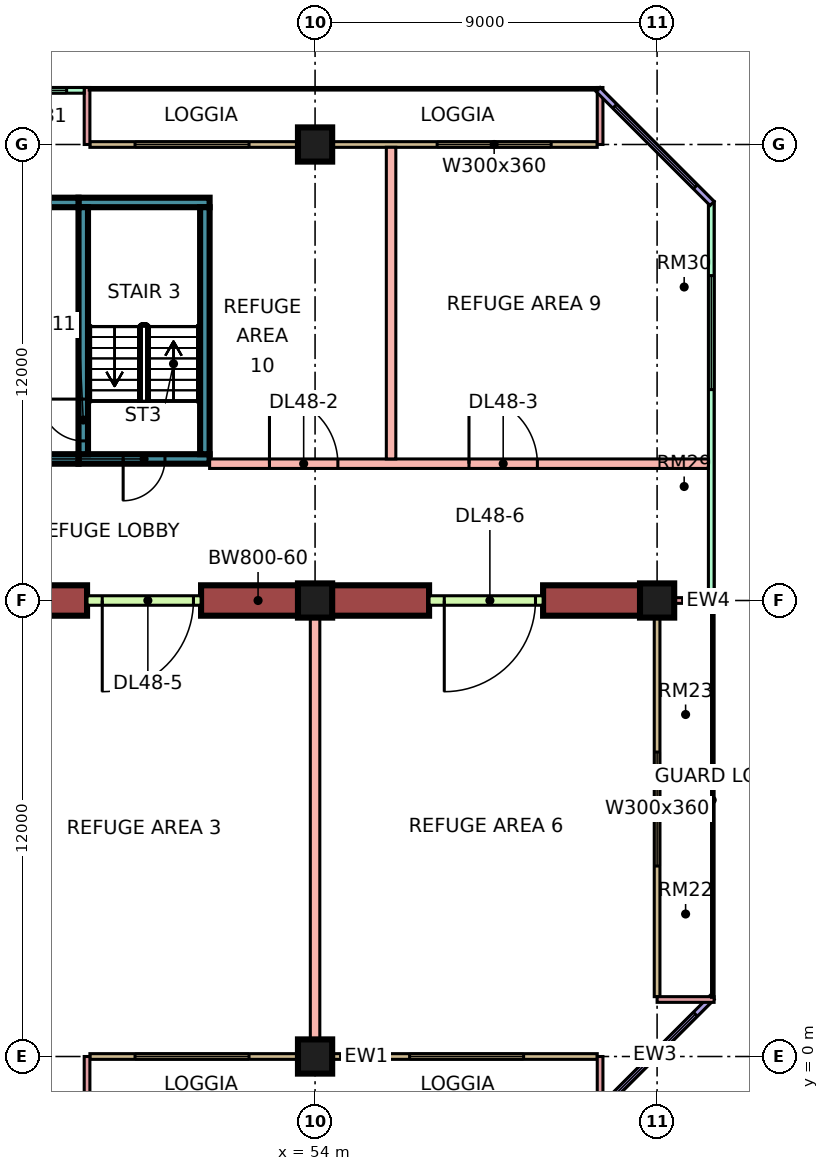
"""IFC4 building model, lengths in metres.
Left out: names, types, materials, properties, quantities, classifications, styles, units other than length and angle.
Written with IfcOpenShell. Run it as: python <this file> out.ifc"""

import sys

from ifc_helpers import new_model, si_unit, direction, frame, frame_2d, origin, origin_2d, place, context, subcontext, project, spatial, rectangle, extrude, element, fill, save


model = new_model("IFC4")
c1 = context("Model", 3, precision=1e-05, world=origin(), true_north=direction((0.0, 1.0)))
c2 = subcontext(c1, "Body", "Model", "MODEL_VIEW")
j1 = project(units=[si_unit("LENGTHUNIT", "METRE"), si_unit("PLANEANGLEUNIT", "RADIAN")], contexts=[c1])
p1 = place(None, origin())
s1 = spatial("IfcSite", under=j1, at=p1, CompositionType="ELEMENT")
p2 = place(p1, origin())
s2 = spatial("IfcBuilding", under=s1, at=p2, CompositionType="ELEMENT")
p3 = place(p2, frame((0.0, 0.0, 206.15)))
s3 = spatial("IfcBuildingStorey", under=s2, at=p3, CompositionType="ELEMENT", Elevation=206.15)
p4 = place(p3, frame((54.0, 0.0, 0.0), z_axis=(0.0, 0.0, 1.0), x_axis=(1.0, 0.0, 0.0)))
e1 = element("IfcColumn", 1, at=p4, inside=s3, PredefinedType="COLUMN", context=c2, shape_type="SweptSolid", body=[
    extrude(rectangle(XDim=0.9, YDim=0.9, at=origin_2d()), origin(), (0.0, 0.0, 1.0), 5.5),
])
p5 = place(p3, frame((54.0, 12.0, 0.0), z_axis=(0.0, 0.0, 1.0), x_axis=(1.0, 0.0, 0.0)))
e2 = element("IfcColumn", 2, at=p5, inside=s3, PredefinedType="COLUMN", context=c2, shape_type="SweptSolid", body=[
    extrude(rectangle(XDim=0.9, YDim=0.9, at=origin_2d()), origin(), (0.0, 0.0, 1.0), 5.5),
])
for number, where, z_axis, x_axis in (
    (3, (54.0, 24.0, 0.0), (0.0, 0.0, 1.0), (1.0, 0.0, 0.0)),
    (4, (63.0, 12.0, 0.0), (0.0, 0.0, 1.0), (1.0, 0.0, 0.0)),
):
    element("IfcColumn", number, at=place(p3, frame(where, z_axis=z_axis, x_axis=x_axis)), inside=s3, PredefinedType="COLUMN", context=c2, shape_type="SweptSolid", body=[
        extrude(rectangle(XDim=0.9, YDim=0.9, at=origin_2d()), origin(), (0.0, 0.0, 1.0), 5.5),
    ])
p6 = place(p3, frame((47.775, 15.725, 0.0), z_axis=(0.0, 0.0, 1.0), x_axis=(1.0, 0.0, 0.0)))
e5 = element("IfcWall", 5, at=p6, inside=s3, PredefinedType="SHEAR", context=c2, shape_type="SweptSolid", body=[
    extrude(rectangle(XDim=3.45, YDim=0.25, at=frame_2d((1.725, 0.0))), origin(), (0.0, 0.0, 1.0), 5.5),
])
p7 = place(p6, frame((1.175, 0.0, 0.0)))
e6 = element("IfcOpeningElement", 6, at=p7, cuts=e5, PredefinedType="OPENING", context=c2, shape_type="SweptSolid", body=[
    extrude(rectangle(XDim=1.1, YDim=2.2, at=frame_2d((0.55, 1.1))), frame((0.0, 0.135, 0.0), z_axis=(0.0, -1.0, 0.0), x_axis=(1.0, 0.0, 0.0)), (0.0, 0.0, 1.0), 0.27),
])
p8 = place(p3, frame((47.775, 22.475, 0.0), z_axis=(0.0, 0.0, 1.0), x_axis=(1.0, 0.0, 0.0)))
e7 = element("IfcWall", 7, at=p8, inside=s3, PredefinedType="SHEAR", context=c2, shape_type="SweptSolid", body=[
    extrude(rectangle(XDim=3.45, YDim=0.25, at=frame_2d((1.725, 0.0))), origin(), (0.0, 0.0, 1.0), 5.5),
])
p9 = place(p3, frame((47.9, 15.85, 0.0), z_axis=(0.0, 0.0, 1.0), x_axis=(0.0, 1.0, 0.0)))
e8 = element("IfcWall", 8, at=p9, inside=s3, PredefinedType="SHEAR", context=c2, shape_type="SweptSolid", body=[
    extrude(rectangle(XDim=6.5, YDim=0.25, at=frame_2d((3.25, 0.0))), origin(), (0.0, 0.0, 1.0), 5.5),
])
p10 = place(p9, frame((0.35, 0.0, 0.0)))
e9 = element("IfcOpeningElement", 9, at=p10, cuts=e8, PredefinedType="OPENING", context=c2, shape_type="SweptSolid", body=[
    extrude(rectangle(XDim=1.1, YDim=2.2, at=frame_2d((0.55, 1.1))), frame((0.0, 0.135, 0.0), z_axis=(0.0, -1.0, 0.0), x_axis=(1.0, 0.0, 0.0)), (0.0, 0.0, 1.0), 0.27),
])
p11 = place(p3, frame((51.1, 15.85, 0.0), z_axis=(0.0, 0.0, 1.0), x_axis=(0.0, 1.0, 0.0)))
e10 = element("IfcWall", 10, at=p11, inside=s3, PredefinedType="SHEAR", context=c2, shape_type="SweptSolid", body=[
    extrude(rectangle(XDim=6.5, YDim=0.25, at=frame_2d((3.25, 0.0))), origin(), (0.0, 0.0, 1.0), 5.5),
])
p12 = place(p3, frame((44.35, 15.725, 0.0), z_axis=(0.0, 0.0, 1.0), x_axis=(1.0, 0.0, 0.0)))
e11 = element("IfcWall", 11, at=p12, inside=s3, PredefinedType="SHEAR", context=c2, shape_type="SweptSolid", body=[
    extrude(rectangle(XDim=3.425, YDim=0.25, at=frame_2d((1.712, 0.0))), origin(), (0.0, 0.0, 1.0), 5.5),
])
p13 = place(p12, frame((1.25, 0.0, 0.0)))
e12 = element("IfcOpeningElement", 12, at=p13, cuts=e11, PredefinedType="OPENING", context=c2, shape_type="SweptSolid", body=[
    extrude(rectangle(XDim=1.2, YDim=2.2, at=frame_2d((0.6, 1.1))), frame((0.0, 0.135, 0.0), z_axis=(0.0, -1.0, 0.0), x_axis=(1.0, 0.0, 0.0)), (0.0, 0.0, 1.0), 0.27),
])
p14 = place(p3, frame((44.35, 22.475, 0.0), z_axis=(0.0, 0.0, 1.0), x_axis=(1.0, 0.0, 0.0)))
e13 = element("IfcWall", 13, at=p14, inside=s3, PredefinedType="SHEAR", context=c2, shape_type="SweptSolid", body=[
    extrude(rectangle(XDim=3.425, YDim=0.25, at=frame_2d((1.712, 0.0))), origin(), (0.0, 0.0, 1.0), 5.5),
])
p15 = place(p3, frame((45.0, 12.0, 0.0), z_axis=(0.0, 0.0, 1.0), x_axis=(1.0, 0.0, 0.0)))
e14 = element("IfcWall", 14, at=p15, inside=s3, PredefinedType="SHEAR", context=c2, shape_type="SweptSolid", body=[
    extrude(rectangle(XDim=3.0, YDim=0.8, at=frame_2d((1.5, 0.0))), origin(), (0.0, 0.0, 1.0), 5.1),
])
p16 = place(p3, frame((51.0, 12.0, 0.0), z_axis=(0.0, 0.0, 1.0), x_axis=(1.0, 0.0, 0.0)))
e15 = element("IfcWall", 15, at=p16, inside=s3, PredefinedType="SHEAR", context=c2, shape_type="SweptSolid", body=[
    extrude(rectangle(XDim=3.0, YDim=0.8, at=frame_2d((1.5, 0.0))), origin(), (0.0, 0.0, 1.0), 5.1),
])
e16 = element("IfcWall", 16, at=p5, inside=s3, PredefinedType="SHEAR", context=c2, shape_type="SweptSolid", body=[
    extrude(rectangle(XDim=3.0, YDim=0.8, at=frame_2d((1.5, 0.0))), origin(), (0.0, 0.0, 1.0), 5.1),
])
p17 = place(p3, frame((60.0, 12.0, 0.0), z_axis=(0.0, 0.0, 1.0), x_axis=(1.0, 0.0, 0.0)))
e17 = element("IfcWall", 17, at=p17, inside=s3, PredefinedType="SHEAR", context=c2, shape_type="SweptSolid", body=[
    extrude(rectangle(XDim=3.0, YDim=0.8, at=frame_2d((1.5, 0.0))), origin(), (0.0, 0.0, 1.0), 5.1),
])
p18 = place(p3, frame((61.425, 24.0, 0.0), z_axis=(0.0, 0.0, 1.0), x_axis=(-1.0, 0.0, 0.0)))
e18 = element("IfcWall", 18, at=p18, inside=s3, PredefinedType="SOLIDWALL", context=c2, shape_type="SweptSolid", body=[
    extrude(rectangle(XDim=13.35, YDim=0.15, at=frame_2d((6.675, 0.0))), origin(), (0.0, 0.0, 1.0), 5.1),
])
p19 = place(p18, frame((1.212, 0.0, 0.45)))
e19 = element("IfcOpeningElement", 19, at=p19, cuts=e18, PredefinedType="OPENING", context=c2, shape_type="SweptSolid", body=[
    extrude(rectangle(XDim=3.0, YDim=3.6, at=frame_2d((1.5, 1.8))), frame((0.0, 0.085, 0.0), z_axis=(0.0, -1.0, 0.0), x_axis=(1.0, 0.0, 0.0)), (0.0, 0.0, 1.0), 0.17),
])
p20 = place(p18, frame((9.163, 0.0, 0.45)))
e20 = element("IfcOpeningElement", 20, at=p20, cuts=e18, PredefinedType="OPENING", context=c2, shape_type="SweptSolid", body=[
    extrude(rectangle(XDim=3.0, YDim=3.6, at=frame_2d((1.5, 1.8))), frame((0.0, 0.085, 0.0), z_axis=(0.0, -1.0, 0.0), x_axis=(1.0, 0.0, 0.0)), (0.0, 0.0, 1.0), 0.17),
])
for number, where, z_axis, x_axis in (
    (21, (61.5, 25.5, 0.0), (0.0, 0.0, 1.0), (0.0, -1.0, 0.0)),
    (22, (48.0, 25.5, 0.0), (0.0, 0.0, 1.0), (0.0, -1.0, 0.0)),
):
    element("IfcWall", number, at=place(p3, frame(where, z_axis=z_axis, x_axis=x_axis)), inside=s3, PredefinedType="SOLIDWALL", context=c2, shape_type="SweptSolid", body=[
        extrude(rectangle(XDim=1.5, YDim=0.15, at=frame_2d((0.75, 0.0))), origin(), (0.0, 0.0, 1.0), 5.1),
    ])
p21 = place(p3, frame((47.925, 25.425, 0.0), z_axis=(0.0, 0.0, 1.0), x_axis=(-1.0, 0.0, 0.0)))
e23 = element("IfcWall", 23, at=p21, inside=s3, PredefinedType="SOLIDWALL", context=c2, shape_type="SweptSolid", body=[
    extrude(rectangle(XDim=7.425, YDim=0.15, at=frame_2d((3.712, 0.0))), origin(), (0.0, 0.0, 1.0), 5.1),
])
p22 = place(p21, frame((0.462, 0.0, 0.45)))
e24 = element("IfcOpeningElement", 24, at=p22, cuts=e23, PredefinedType="OPENING", context=c2, shape_type="SweptSolid", body=[
    extrude(rectangle(XDim=3.0, YDim=3.6, at=frame_2d((1.5, 1.8))), frame((0.0, 0.085, 0.0), z_axis=(0.0, -1.0, 0.0), x_axis=(1.0, 0.0, 0.0)), (0.0, 0.0, 1.0), 0.17),
])
p23 = place(p21, frame((4.475, 0.0, 0.45)))
e25 = element("IfcOpeningElement", 25, at=p23, cuts=e23, PredefinedType="OPENING", context=c2, shape_type="SweptSolid", body=[
    extrude(rectangle(XDim=2.4, YDim=3.6, at=frame_2d((1.2, 1.8))), frame((0.0, 0.085, 0.0), z_axis=(0.0, -1.0, 0.0), x_axis=(1.0, 0.0, 0.0)), (0.0, 0.0, 1.0), 0.17),
])
p24 = place(p3, frame((48.075, 0.0, 0.0), z_axis=(0.0, 0.0, 1.0), x_axis=(1.0, 0.0, 0.0)))
e26 = element("IfcWall", 26, at=p24, inside=s3, PredefinedType="SOLIDWALL", context=c2, shape_type="SweptSolid", body=[
    extrude(rectangle(XDim=13.35, YDim=0.15, at=frame_2d((6.675, 0.0))), origin(), (0.0, 0.0, 1.0), 5.1),
])
p25 = place(p24, frame((1.188, 0.0, 0.45)))
e27 = element("IfcOpeningElement", 27, at=p25, cuts=e26, PredefinedType="OPENING", context=c2, shape_type="SweptSolid", body=[
    extrude(rectangle(XDim=3.0, YDim=3.6, at=frame_2d((1.5, 1.8))), frame((0.0, 0.085, 0.0), z_axis=(0.0, -1.0, 0.0), x_axis=(1.0, 0.0, 0.0)), (0.0, 0.0, 1.0), 0.17),
])
p26 = place(p24, frame((8.413, 0.0, 0.45)))
e28 = element("IfcOpeningElement", 28, at=p26, cuts=e26, PredefinedType="OPENING", context=c2, shape_type="SweptSolid", body=[
    extrude(rectangle(XDim=3.0, YDim=3.6, at=frame_2d((1.5, 1.8))), frame((0.0, 0.085, 0.0), z_axis=(0.0, -1.0, 0.0), x_axis=(1.0, 0.0, 0.0)), (0.0, 0.0, 1.0), 0.17),
])
for number, where, z_axis, x_axis in (
    (29, (48.0, -1.5, 0.0), (0.0, 0.0, 1.0), (0.0, 1.0, 0.0)),
    (30, (61.5, -1.5, 0.0), (0.0, 0.0, 1.0), (0.0, 1.0, 0.0)),
):
    element("IfcWall", number, at=place(p3, frame(where, z_axis=z_axis, x_axis=x_axis)), inside=s3, PredefinedType="SOLIDWALL", context=c2, shape_type="SweptSolid", body=[
        extrude(rectangle(XDim=1.5, YDim=0.15, at=frame_2d((0.75, 0.0))), origin(), (0.0, 0.0, 1.0), 5.1),
    ])
p27 = place(p3, frame((61.447, -1.447, 0.0), z_axis=(0.0, 0.0, 1.0), x_axis=(0.707106781187, 0.707106781187, 0.0)))
e31 = element("IfcWall", 31, at=p27, inside=s3, PredefinedType="SOLIDWALL", context=c2, shape_type="SweptSolid", body=[
    extrude(rectangle(XDim=4.243, YDim=0.15, at=frame_2d((2.121, 0.0))), origin(), (0.0, 0.0, 1.0), 5.1),
])
p28 = place(p27, frame((0.621, 0.0, 0.45)))
e32 = element("IfcOpeningElement", 32, at=p28, cuts=e31, PredefinedType="OPENING", context=c2, shape_type="SweptSolid", body=[
    extrude(rectangle(XDim=3.0, YDim=3.6, at=frame_2d((1.5, 1.8))), frame((0.0, 0.085, 0.0), z_axis=(0.0, -1.0, 0.0), x_axis=(1.0, 0.0, 0.0)), (0.0, 0.0, 1.0), 0.17),
])
p29 = place(p3, frame((63.0, 1.575, 0.0), z_axis=(0.0, 0.0, 1.0), x_axis=(0.0, 1.0, 0.0)))
e33 = element("IfcWall", 33, at=p29, inside=s3, PredefinedType="SOLIDWALL", context=c2, shape_type="SweptSolid", body=[
    extrude(rectangle(XDim=10.35, YDim=0.15, at=frame_2d((5.175, 0.0))), origin(), (0.0, 0.0, 1.0), 5.1),
])
p30 = place(p29, frame((3.438, 0.0, 0.45)))
e34 = element("IfcOpeningElement", 34, at=p30, cuts=e33, PredefinedType="OPENING", context=c2, shape_type="SweptSolid", body=[
    extrude(rectangle(XDim=3.0, YDim=3.6, at=frame_2d((1.5, 1.8))), frame((0.0, 0.085, 0.0), z_axis=(0.0, -1.0, 0.0), x_axis=(1.0, 0.0, 0.0)), (0.0, 0.0, 1.0), 0.17),
])
for number, where, z_axis, x_axis in (
    (35, (64.5, 1.5, 0.0), (0.0, 0.0, 1.0), (-1.0, 0.0, 0.0)),
    (36, (64.5, 12.0, 0.0), (0.0, 0.0, 1.0), (-1.0, 0.0, 0.0)),
):
    element("IfcWall", number, at=place(p3, frame(where, z_axis=z_axis, x_axis=x_axis)), inside=s3, PredefinedType="SOLIDWALL", context=c2, shape_type="SweptSolid", body=[
        extrude(rectangle(XDim=1.5, YDim=0.15, at=frame_2d((0.75, 0.0))), origin(), (0.0, 0.0, 1.0), 5.1),
    ])
p31 = place(p3, frame((64.425, 12.075, 0.0), z_axis=(0.0, 0.0, 1.0), x_axis=(0.0, 1.0, 0.0)))
e37 = element("IfcWall", 37, at=p31, inside=s3, PredefinedType="SOLIDWALL", context=c2, shape_type="SweptSolid", body=[
    extrude(rectangle(XDim=10.425, YDim=0.15, at=frame_2d((5.212, 0.0))), origin(), (0.0, 0.0, 1.0), 5.1),
])
p32 = place(p31, frame((5.475, 0.0, 0.45)))
e38 = element("IfcOpeningElement", 38, at=p32, cuts=e37, PredefinedType="OPENING", context=c2, shape_type="SweptSolid", body=[
    extrude(rectangle(XDim=3.0, YDim=3.6, at=frame_2d((1.5, 1.8))), frame((0.0, 0.085, 0.0), z_axis=(0.0, -1.0, 0.0), x_axis=(1.0, 0.0, 0.0)), (0.0, 0.0, 1.0), 0.17),
])
p33 = place(p3, frame((64.447, 22.447, 0.0), z_axis=(0.0, 0.0, 1.0), x_axis=(-0.707106781187, 0.707106781187, 0.0)))
e39 = element("IfcWall", 39, at=p33, inside=s3, PredefinedType="SOLIDWALL", context=c2, shape_type="SweptSolid", body=[
    extrude(rectangle(XDim=4.243, YDim=0.15, at=frame_2d((2.121, 0.0))), origin(), (0.0, 0.0, 1.0), 5.1),
])
p34 = place(p33, frame((0.621, 0.0, 0.45)))
e40 = element("IfcOpeningElement", 40, at=p34, cuts=e39, PredefinedType="OPENING", context=c2, shape_type="SweptSolid", body=[
    extrude(rectangle(XDim=3.0, YDim=3.6, at=frame_2d((1.5, 1.8))), frame((0.0, 0.085, 0.0), z_axis=(0.0, -1.0, 0.0), x_axis=(1.0, 0.0, 0.0)), (0.0, 0.0, 1.0), 0.17),
])
p35 = place(p3, frame((47.999, 12.0, 0.0), z_axis=(0.0, 0.0, 1.0), x_axis=(1.0, 0.0, 0.0)))
e41 = element("IfcWall", 41, at=p35, inside=s3, PredefinedType="PARTITIONING", context=c2, shape_type="SweptSolid", body=[
    extrude(rectangle(XDim=3.002, YDim=0.25, at=frame_2d((1.501, 0.0))), origin(), (0.0, 0.0, 1.0), 3.05),
])
p36 = place(p35, frame((0.401, 0.0, 0.0)))
e42 = element("IfcOpeningElement", 42, at=p36, cuts=e41, PredefinedType="OPENING", context=c2, shape_type="SweptSolid", body=[
    extrude(rectangle(XDim=2.4, YDim=2.1, at=frame_2d((1.2, 1.05))), frame((0.0, 0.135, 0.0), z_axis=(0.0, -1.0, 0.0), x_axis=(1.0, 0.0, 0.0)), (0.0, 0.0, 1.0), 0.27),
])
p37 = place(p3, frame((51.225, 15.6, 0.0), z_axis=(0.0, 0.0, 1.0), x_axis=(1.0, 0.0, 0.0)))
e43 = element("IfcWall", 43, at=p37, inside=s3, PredefinedType="PARTITIONING", context=c2, shape_type="SweptSolid", body=[
    extrude(rectangle(XDim=13.125, YDim=0.25, at=frame_2d((6.562, 0.0))), origin(), (0.0, 0.0, 1.0), 5.1),
])
p38 = place(p37, frame((1.575, 0.0, 0.0)))
e44 = element("IfcOpeningElement", 44, at=p38, cuts=e43, PredefinedType="OPENING", context=c2, shape_type="SweptSolid", body=[
    extrude(rectangle(XDim=1.8, YDim=2.1, at=frame_2d((0.9, 1.05))), frame((0.0, 0.135, 0.0), z_axis=(0.0, -1.0, 0.0), x_axis=(1.0, 0.0, 0.0)), (0.0, 0.0, 1.0), 0.27),
])
p39 = place(p37, frame((6.825, 0.0, 0.0)))
e45 = element("IfcOpeningElement", 45, at=p39, cuts=e43, PredefinedType="OPENING", context=c2, shape_type="SweptSolid", body=[
    extrude(rectangle(XDim=1.8, YDim=2.1, at=frame_2d((0.9, 1.05))), frame((0.0, 0.135, 0.0), z_axis=(0.0, -1.0, 0.0), x_axis=(1.0, 0.0, 0.0)), (0.0, 0.0, 1.0), 0.27),
])
p40 = place(p3, frame((54.0, 0.074, 0.0), z_axis=(0.0, 0.0, 1.0), x_axis=(0.0, 1.0, 0.0)))
e46 = element("IfcWall", 46, at=p40, inside=s3, PredefinedType="PARTITIONING", context=c2, shape_type="SweptSolid", body=[
    extrude(rectangle(XDim=11.527, YDim=0.25, at=frame_2d((5.764, 0.0))), origin(), (0.0, 0.0, 1.0), 5.1),
])
p41 = place(p3, frame((56.0, 15.725, 0.0), z_axis=(0.0, 0.0, 1.0), x_axis=(0.0, 1.0, 0.0)))
e47 = element("IfcWall", 47, at=p41, inside=s3, PredefinedType="PARTITIONING", context=c2, shape_type="SweptSolid", body=[
    extrude(rectangle(XDim=8.201, YDim=0.25, at=frame_2d((4.101, 0.0))), origin(), (0.0, 0.0, 1.0), 5.1),
])
p42 = place(p3, frame((56.999, 12.0, 0.0), z_axis=(0.0, 0.0, 1.0), x_axis=(1.0, 0.0, 0.0)))
e48 = element("IfcWall", 48, at=p42, inside=s3, PredefinedType="PARTITIONING", context=c2, shape_type="SweptSolid", body=[
    extrude(rectangle(XDim=3.002, YDim=0.25, at=frame_2d((1.501, 0.0))), origin(), (0.0, 0.0, 1.0), 3.05),
])
p43 = place(p42, frame((0.401, 0.0, 0.0)))
e49 = element("IfcOpeningElement", 49, at=p43, cuts=e48, PredefinedType="OPENING", context=c2, shape_type="SweptSolid", body=[
    extrude(rectangle(XDim=2.4, YDim=2.1, at=frame_2d((1.2, 1.05))), frame((0.0, 0.135, 0.0), z_axis=(0.0, -1.0, 0.0), x_axis=(1.0, 0.0, 0.0)), (0.0, 0.0, 1.0), 0.27),
])
p44 = place(p19, origin())
e50 = element("IfcWindow", 50, at=p44, inside=s3, PartitioningType="SINGLE_PANEL", PredefinedType="WINDOW", context=c2, shape_type="SweptSolid", body=[
    extrude(rectangle(XDim=3.0, YDim=3.6, at=frame_2d((1.5, 1.8))), frame((0.0, 0.03, 0.0), z_axis=(0.0, -1.0, 0.0), x_axis=(1.0, 0.0, 0.0)), (0.0, 0.0, 1.0), 0.06),
])
fill(e19, e50)
p45 = place(p20, origin())
e51 = element("IfcWindow", 51, at=p45, inside=s3, PartitioningType="SINGLE_PANEL", PredefinedType="WINDOW", context=c2, shape_type="SweptSolid", body=[
    extrude(rectangle(XDim=3.0, YDim=3.6, at=frame_2d((1.5, 1.8))), frame((0.0, 0.03, 0.0), z_axis=(0.0, -1.0, 0.0), x_axis=(1.0, 0.0, 0.0)), (0.0, 0.0, 1.0), 0.06),
])
fill(e20, e51)
p46 = place(p22, origin())
e52 = element("IfcWindow", 52, at=p46, inside=s3, PartitioningType="SINGLE_PANEL", PredefinedType="WINDOW", context=c2, shape_type="SweptSolid", body=[
    extrude(rectangle(XDim=3.0, YDim=3.6, at=frame_2d((1.5, 1.8))), frame((0.0, 0.03, 0.0), z_axis=(0.0, -1.0, 0.0), x_axis=(1.0, 0.0, 0.0)), (0.0, 0.0, 1.0), 0.06),
])
fill(e24, e52)
p47 = place(p25, origin())
e53 = element("IfcWindow", 53, at=p47, inside=s3, PartitioningType="SINGLE_PANEL", PredefinedType="WINDOW", context=c2, shape_type="SweptSolid", body=[
    extrude(rectangle(XDim=3.0, YDim=3.6, at=frame_2d((1.5, 1.8))), frame((0.0, 0.03, 0.0), z_axis=(0.0, -1.0, 0.0), x_axis=(1.0, 0.0, 0.0)), (0.0, 0.0, 1.0), 0.06),
])
fill(e27, e53)
p48 = place(p26, origin())
e54 = element("IfcWindow", 54, at=p48, inside=s3, PartitioningType="SINGLE_PANEL", PredefinedType="WINDOW", context=c2, shape_type="SweptSolid", body=[
    extrude(rectangle(XDim=3.0, YDim=3.6, at=frame_2d((1.5, 1.8))), frame((0.0, 0.03, 0.0), z_axis=(0.0, -1.0, 0.0), x_axis=(1.0, 0.0, 0.0)), (0.0, 0.0, 1.0), 0.06),
])
fill(e28, e54)
p49 = place(p28, origin())
e55 = element("IfcWindow", 55, at=p49, inside=s3, PartitioningType="SINGLE_PANEL", PredefinedType="WINDOW", context=c2, shape_type="SweptSolid", body=[
    extrude(rectangle(XDim=3.0, YDim=3.6, at=frame_2d((1.5, 1.8))), frame((0.0, 0.03, 0.0), z_axis=(0.0, -1.0, 0.0), x_axis=(1.0, 0.0, 0.0)), (0.0, 0.0, 1.0), 0.06),
])
fill(e32, e55)
p50 = place(p30, origin())
e56 = element("IfcWindow", 56, at=p50, inside=s3, PartitioningType="SINGLE_PANEL", PredefinedType="WINDOW", context=c2, shape_type="SweptSolid", body=[
    extrude(rectangle(XDim=3.0, YDim=3.6, at=frame_2d((1.5, 1.8))), frame((0.0, 0.03, 0.0), z_axis=(0.0, -1.0, 0.0), x_axis=(1.0, 0.0, 0.0)), (0.0, 0.0, 1.0), 0.06),
])
fill(e34, e56)
p51 = place(p32, origin())
e57 = element("IfcWindow", 57, at=p51, inside=s3, PartitioningType="SINGLE_PANEL", PredefinedType="WINDOW", context=c2, shape_type="SweptSolid", body=[
    extrude(rectangle(XDim=3.0, YDim=3.6, at=frame_2d((1.5, 1.8))), frame((0.0, 0.03, 0.0), z_axis=(0.0, -1.0, 0.0), x_axis=(1.0, 0.0, 0.0)), (0.0, 0.0, 1.0), 0.06),
])
fill(e38, e57)
p52 = place(p34, origin())
e58 = element("IfcWindow", 58, at=p52, inside=s3, PartitioningType="SINGLE_PANEL", PredefinedType="WINDOW", context=c2, shape_type="SweptSolid", body=[
    extrude(rectangle(XDim=3.0, YDim=3.6, at=frame_2d((1.5, 1.8))), frame((0.0, 0.03, 0.0), z_axis=(0.0, -1.0, 0.0), x_axis=(1.0, 0.0, 0.0)), (0.0, 0.0, 1.0), 0.06),
])
fill(e40, e58)
p53 = place(p7, frame((1.1, 0.0, 0.0), z_axis=(0.0, 0.0, 1.0), x_axis=(-1.0, 0.0, 0.0)))
e59 = element("IfcDoor", 59, at=p53, inside=s3, OperationType="SINGLE_SWING_LEFT", PredefinedType="DOOR", context=c2, shape_type="SweptSolid", body=[
    extrude(rectangle(XDim=1.1, YDim=2.2, at=frame_2d((0.55, 1.1))), frame((0.0, 0.025, 0.0), z_axis=(0.0, -1.0, 0.0), x_axis=(1.0, 0.0, 0.0)), (0.0, 0.0, 1.0), 0.05),
])
fill(e6, e59)
p54 = place(p10, frame((1.1, 0.0, 0.0), z_axis=(0.0, 0.0, 1.0), x_axis=(-1.0, 0.0, 0.0)))
e60 = element("IfcDoor", 60, at=p54, inside=s3, OperationType="SINGLE_SWING_RIGHT", PredefinedType="DOOR", context=c2, shape_type="SweptSolid", body=[
    extrude(rectangle(XDim=1.1, YDim=2.2, at=frame_2d((0.55, 1.1))), frame((0.0, 0.025, 0.0), z_axis=(0.0, -1.0, 0.0), x_axis=(1.0, 0.0, 0.0)), (0.0, 0.0, 1.0), 0.05),
])
fill(e9, e60)
p55 = place(p38, origin())
e61 = element("IfcDoor", 61, at=p55, inside=s3, OperationType="DOUBLE_DOOR_SINGLE_SWING", PredefinedType="DOOR", context=c2, shape_type="SweptSolid", body=[
    extrude(rectangle(XDim=1.8, YDim=2.1, at=frame_2d((0.9, 1.05))), frame((0.0, 0.025, 0.0), z_axis=(0.0, -1.0, 0.0), x_axis=(1.0, 0.0, 0.0)), (0.0, 0.0, 1.0), 0.05),
])
fill(e44, e61)
p56 = place(p39, origin())
e62 = element("IfcDoor", 62, at=p56, inside=s3, OperationType="DOUBLE_DOOR_SINGLE_SWING", PredefinedType="DOOR", context=c2, shape_type="SweptSolid", body=[
    extrude(rectangle(XDim=1.8, YDim=2.1, at=frame_2d((0.9, 1.05))), frame((0.0, 0.025, 0.0), z_axis=(0.0, -1.0, 0.0), x_axis=(1.0, 0.0, 0.0)), (0.0, 0.0, 1.0), 0.05),
])
fill(e45, e62)
p57 = place(p36, frame((2.4, 0.0, 0.0), z_axis=(0.0, 0.0, 1.0), x_axis=(-1.0, 0.0, 0.0)))
e63 = element("IfcDoor", 63, at=p57, inside=s3, OperationType="DOUBLE_DOOR_SINGLE_SWING", PredefinedType="DOOR", context=c2, shape_type="SweptSolid", body=[
    extrude(rectangle(XDim=2.4, YDim=2.1, at=frame_2d((1.2, 1.05))), frame((0.0, 0.025, 0.0), z_axis=(0.0, -1.0, 0.0), x_axis=(1.0, 0.0, 0.0)), (0.0, 0.0, 1.0), 0.05),
])
fill(e42, e63)
p58 = place(p43, frame((2.4, 0.0, 0.0), z_axis=(0.0, 0.0, 1.0), x_axis=(-1.0, 0.0, 0.0)))
e64 = element("IfcDoor", 64, at=p58, inside=s3, OperationType="DOUBLE_DOOR_SINGLE_SWING", PredefinedType="DOOR", context=c2, shape_type="SweptSolid", body=[
    extrude(rectangle(XDim=2.4, YDim=2.1, at=frame_2d((1.2, 1.05))), frame((0.0, 0.025, 0.0), z_axis=(0.0, -1.0, 0.0), x_axis=(1.0, 0.0, 0.0)), (0.0, 0.0, 1.0), 0.05),
])
fill(e49, e64)
save(model, sys.argv[1])
